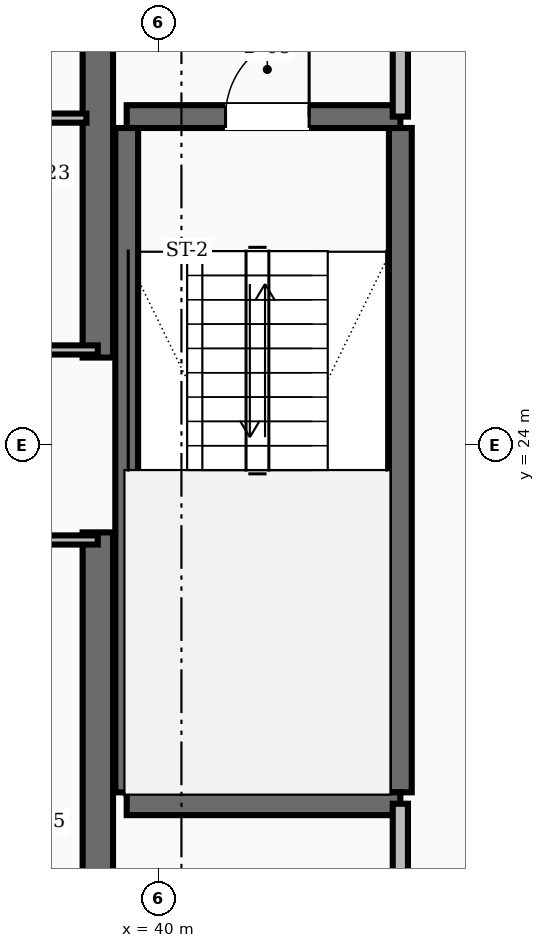
"""IFC4 building model, lengths in metres.
Left out: names, types, materials, properties, quantities, classifications, styles, units other than length and angle.
Written with IfcOpenShell. Run it as: python <this file> out.ifc"""

import sys

from ifc_helpers import new_model, si_unit, direction, frame, frame_2d, origin, place, context, subcontext, project, spatial, rectangle, extrude, element, fill, save


model = new_model("IFC4")
c1 = context("Model", 3, precision=1e-05, world=origin(), true_north=direction((0.0, 1.0)))
c2 = subcontext(c1, "Body", "Model", "MODEL_VIEW")
j1 = project(units=[si_unit("LENGTHUNIT", "METRE"), si_unit("PLANEANGLEUNIT", "RADIAN")], contexts=[c1])
p1 = place(None, origin())
s1 = spatial("IfcSite", under=j1, at=p1, CompositionType="ELEMENT")
p2 = place(p1, origin())
s2 = spatial("IfcBuilding", under=s1, at=p2, CompositionType="ELEMENT")
p3 = place(p2, frame((0.0, 0.0, 55.6)))
s3 = spatial("IfcBuildingStorey", under=s2, at=p3, CompositionType="ELEMENT", Elevation=55.6)
for number, where, z_axis, x_axis in (
    (1, (39.2, 16.55, 0.0), (0.0, 0.0, 1.0), (0.0, 1.0, 0.0)),
    (2, (39.2, 25.15, 0.0), (0.0, 0.0, 1.0), (0.0, 1.0, 0.0)),
):
    element("IfcWall", number, at=place(p3, frame(where, z_axis=z_axis, x_axis=x_axis)), inside=s3, PredefinedType="SHEAR", context=c2, shape_type="SweptSolid", body=[
        extrude(rectangle(XDim=6.3, YDim=0.4, at=frame_2d((3.15, 0.0))), origin(), (0.0, 0.0, 1.0), 3.6),
    ])
for number, where, z_axis, x_axis in (
    (3, (43.18, 19.43, 0.0), (0.0, 0.0, 1.0), (0.0, 1.0, 0.0)),
    (4, (39.58, 19.43, 0.0), (0.0, 0.0, 1.0), (0.0, 1.0, 0.0)),
):
    element("IfcWall", number, at=place(p3, frame(where, z_axis=z_axis, x_axis=x_axis)), inside=s3, PredefinedType="SHEAR", context=c2, shape_type="SweptSolid", body=[
        extrude(rectangle(XDim=8.74, YDim=0.3, at=frame_2d((4.37, 0.0))), origin(), (0.0, 0.0, 1.0), 3.6),
    ])
p4 = place(p3, frame((39.58, 19.28, 0.0), z_axis=(0.0, 0.0, 1.0), x_axis=(1.0, 0.0, 0.0)))
e5 = element("IfcWall", 5, at=p4, inside=s3, PredefinedType="SHEAR", context=c2, shape_type="SweptSolid", body=[
    extrude(rectangle(XDim=3.6, YDim=0.3, at=frame_2d((1.8, 0.0))), origin(), (0.0, 0.0, 1.0), 3.6),
])
p5 = place(p3, frame((39.58, 28.32, 0.0), z_axis=(0.0, 0.0, 1.0), x_axis=(1.0, 0.0, 0.0)))
e6 = element("IfcWall", 6, at=p5, inside=s3, PredefinedType="SHEAR", context=c2, shape_type="SweptSolid", body=[
    extrude(rectangle(XDim=3.6, YDim=0.3, at=frame_2d((1.8, 0.0))), origin(), (0.0, 0.0, 1.0), 3.6),
])
p6 = place(p5, frame((1.3, 0.0, 0.0)))
e7 = element("IfcOpeningElement", 7, at=p6, cuts=e6, PredefinedType="OPENING", context=c2, shape_type="SweptSolid", body=[
    extrude(rectangle(XDim=1.1, YDim=2.1, at=frame_2d((0.55, 1.05))), frame((0.0, 0.16, 0.0), z_axis=(0.0, -1.0, 0.0), x_axis=(1.0, 0.0, 0.0)), (0.0, 0.0, 1.0), 0.32),
])
p7 = place(p3, frame((43.18, 28.32, 0.0), z_axis=(0.0, 0.0, 1.0), x_axis=(0.0, 1.0, 0.0)))
e8 = element("IfcWall", 8, at=p7, inside=s3, PredefinedType="SOLIDWALL", context=c2, shape_type="SweptSolid", body=[
    extrude(rectangle(XDim=3.13, YDim=0.2, at=frame_2d((1.565, 0.0))), origin(), (0.0, 0.0, 1.0), 2.61),
])
p8 = place(p7, frame((1.015, 0.0, 0.0)))
e9 = element("IfcOpeningElement", 9, at=p8, cuts=e8, PredefinedType="OPENING", context=c2, shape_type="SweptSolid", body=[
    extrude(rectangle(XDim=1.1, YDim=2.1, at=frame_2d((0.55, 1.05))), frame((0.0, 0.11, 0.0), z_axis=(0.0, -1.0, 0.0), x_axis=(1.0, 0.0, 0.0)), (0.0, 0.0, 1.0), 0.22),
])
p9 = place(p3, frame((43.18, 16.55, 0.0), z_axis=(0.0, 0.0, 1.0), x_axis=(0.0, 1.0, 0.0)))
e10 = element("IfcWall", 10, at=p9, inside=s3, PredefinedType="SOLIDWALL", context=c2, shape_type="SweptSolid", body=[
    extrude(rectangle(XDim=2.73, YDim=0.2, at=frame_2d((1.365, 0.0))), origin(), (0.0, 0.0, 1.0), 2.61),
])
p10 = place(p9, frame((0.89, 0.0, 0.0)))
e11 = element("IfcOpeningElement", 11, at=p10, cuts=e10, PredefinedType="OPENING", context=c2, shape_type="SweptSolid", body=[
    extrude(rectangle(XDim=0.95, YDim=2.1, at=frame_2d((0.475, 1.05))), frame((0.0, 0.11, 0.0), z_axis=(0.0, -1.0, 0.0), x_axis=(1.0, 0.0, 0.0)), (0.0, 0.0, 1.0), 0.22),
])
for number, where, z_axis, x_axis in (
    (12, (37.4, 25.25, 0.0), (0.0, 0.0, 1.0), (1.0, 0.0, 0.0)),
    (13, (37.4, 22.75, 0.0), (0.0, 0.0, 1.0), (1.0, 0.0, 0.0)),
):
    element("IfcWall", number, at=place(p3, frame(where, z_axis=z_axis, x_axis=x_axis)), inside=s3, PredefinedType="PARTITIONING", context=c2, shape_type="SweptSolid", body=[
        extrude(rectangle(XDim=1.8, YDim=0.12, at=frame_2d((0.9, 0.0))), origin(), (0.0, 0.0, 1.0), 2.61),
    ])
p11 = place(p3, frame((37.4, 28.3, 0.0), z_axis=(0.0, 0.0, 1.0), x_axis=(1.0, 0.0, 0.0)))
e14 = element("IfcWall", 14, at=p11, inside=s3, PredefinedType="PARTITIONING", context=c2, shape_type="SweptSolid", body=[
    extrude(rectangle(XDim=1.65, YDim=0.12, at=frame_2d((0.825, 0.0))), origin(), (0.0, 0.0, 1.0), 2.61),
])
p12 = place(p6, origin())
e15 = element("IfcDoor", 15, at=p12, inside=s3, OperationType="SINGLE_SWING_RIGHT", PredefinedType="DOOR", context=c2, shape_type="SweptSolid", body=[
    extrude(rectangle(XDim=1.1, YDim=2.1, at=frame_2d((0.55, 1.05))), frame((0.0, 0.025, 0.0), z_axis=(0.0, -1.0, 0.0), x_axis=(1.0, 0.0, 0.0)), (0.0, 0.0, 1.0), 0.05),
])
fill(e7, e15)
save(model, sys.argv[1])
